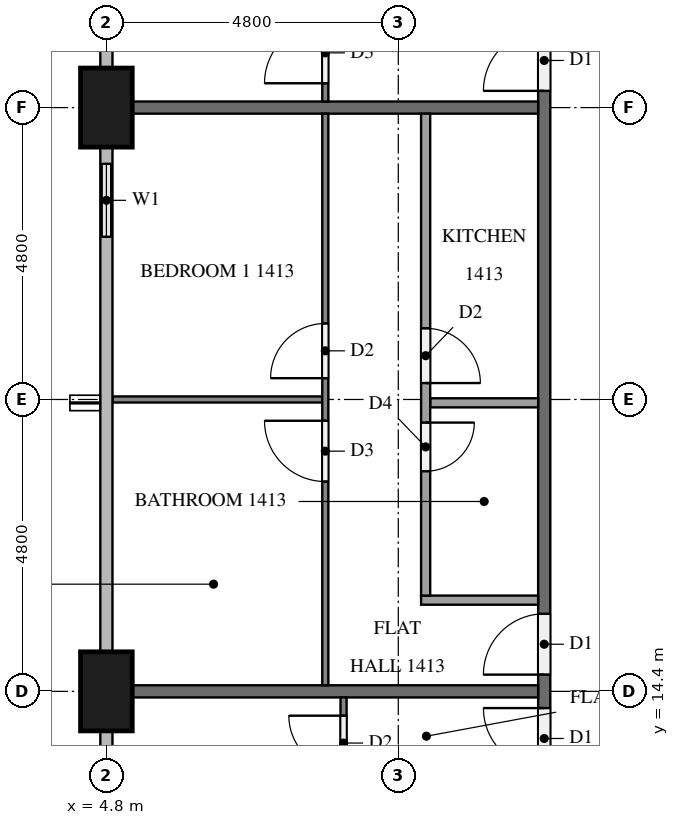
"""IFC4 building model, lengths in metres.
Left out: names, types, materials, properties, quantities, classifications, styles, units other than length and angle.
Written with IfcOpenShell. Run it as: python <this file> out.ifc"""

import sys

from ifc_helpers import new_model, si_unit, direction, frame, frame_2d, origin, origin_2d, place, context, subcontext, project, spatial, rectangle, extrude, element, fill, save


model = new_model("IFC4")
c1 = context("Model", 3, precision=1e-05, world=origin(), true_north=direction((0.0, 1.0)))
c2 = subcontext(c1, "Body", "Model", "MODEL_VIEW")
j1 = project(units=[si_unit("LENGTHUNIT", "METRE"), si_unit("PLANEANGLEUNIT", "RADIAN")], contexts=[c1])
p1 = place(None, origin())
s1 = spatial("IfcSite", under=j1, at=p1, CompositionType="ELEMENT")
p2 = place(p1, origin())
s2 = spatial("IfcBuilding", under=s1, at=p2, CompositionType="ELEMENT")
p3 = place(p2, frame((0.0, 0.0, 59.3)))
s3 = spatial("IfcBuildingStorey", under=s2, at=p3, CompositionType="ELEMENT", Elevation=59.3)
for number, where, z_axis, x_axis in (
    (1, (4.8, 24.0, 0.0), (0.0, 0.0, 1.0), (0.0, 1.0, 0.0)),
    (2, (4.8, 14.4, 0.0), (0.0, 0.0, 1.0), (0.0, 1.0, 0.0)),
):
    element("IfcColumn", number, at=place(p3, frame(where, z_axis=z_axis, x_axis=x_axis)), inside=s3, PredefinedType="COLUMN", context=c2, shape_type="SweptSolid", body=[
        extrude(rectangle(XDim=1.3, YDim=0.85, at=origin_2d()), origin(), (0.0, 0.0, 1.0), 3.2),
    ])
p4 = place(p3, frame((4.8, 23.35, 0.0), z_axis=(0.0, 0.0, 1.0), x_axis=(0.0, -1.0, 0.0)))
e3 = element("IfcWall", 3, at=p4, inside=s3, PredefinedType="SOLIDWALL", context=c2, shape_type="SweptSolid", body=[
    extrude(rectangle(XDim=1.75, YDim=0.15, at=frame_2d((0.875, 0.0))), origin(), (0.0, 0.0, 1.0), 3.2),
])
p5 = place(p4, frame((0.275, 0.0, 0.9)))
e4 = element("IfcOpeningElement", 4, at=p5, cuts=e3, PredefinedType="OPENING", context=c2, shape_type="SweptSolid", body=[
    extrude(rectangle(XDim=1.2, YDim=1.4, at=frame_2d((0.6, 0.7))), frame((0.0, 0.085, 0.0), z_axis=(0.0, -1.0, 0.0), x_axis=(1.0, 0.0, 0.0)), (0.0, 0.0, 1.0), 0.17),
])
p6 = place(p3, frame((4.8, 13.75, 0.0), z_axis=(0.0, 0.0, 1.0), x_axis=(0.0, -1.0, 0.0)))
e5 = element("IfcWall", 5, at=p6, inside=s3, PredefinedType="SOLIDWALL", context=c2, shape_type="SweptSolid", body=[
    extrude(rectangle(XDim=1.75, YDim=0.15, at=frame_2d((0.875, 0.0))), origin(), (0.0, 0.0, 1.0), 3.2),
])
p7 = place(p6, frame((0.275, 0.0, 0.9)))
e6 = element("IfcOpeningElement", 6, at=p7, cuts=e5, PredefinedType="OPENING", context=c2, shape_type="SweptSolid", body=[
    extrude(rectangle(XDim=1.2, YDim=1.4, at=frame_2d((0.6, 0.7))), frame((0.0, 0.085, 0.0), z_axis=(0.0, -1.0, 0.0), x_axis=(1.0, 0.0, 0.0)), (0.0, 0.0, 1.0), 0.17),
])
p8 = place(p3, frame((12.0, 12.1, 0.0), z_axis=(0.0, 0.0, 1.0), x_axis=(0.0, 1.0, 0.0)))
e7 = element("IfcWall", 7, at=p8, inside=s3, PredefinedType="PARTITIONING", context=c2, shape_type="SweptSolid", body=[
    extrude(rectangle(XDim=28.6, YDim=0.2, at=frame_2d((14.3, 0.0))), origin(), (0.0, 0.0, 1.0), 3.2),
])
p9 = place(p8, frame((19.375, 0.0, 0.0)))
e8 = element("IfcOpeningElement", 8, at=p9, cuts=e7, PredefinedType="OPENING", context=c2, shape_type="SweptSolid", body=[
    extrude(rectangle(XDim=1.0, YDim=2.1, at=frame_2d((0.5, 1.05))), frame((0.0, 0.11, 0.0), z_axis=(0.0, -1.0, 0.0), x_axis=(1.0, 0.0, 0.0)), (0.0, 0.0, 1.0), 0.22),
])
p10 = place(p8, frame((12.175, 0.0, 0.0)))
e9 = element("IfcOpeningElement", 9, at=p10, cuts=e7, PredefinedType="OPENING", context=c2, shape_type="SweptSolid", body=[
    extrude(rectangle(XDim=1.0, YDim=2.1, at=frame_2d((0.5, 1.05))), frame((0.0, 0.11, 0.0), z_axis=(0.0, -1.0, 0.0), x_axis=(1.0, 0.0, 0.0)), (0.0, 0.0, 1.0), 0.22),
])
p11 = place(p8, frame((2.575, 0.0, 0.0)))
e10 = element("IfcOpeningElement", 10, at=p11, cuts=e7, PredefinedType="OPENING", context=c2, shape_type="SweptSolid", body=[
    extrude(rectangle(XDim=1.0, YDim=2.1, at=frame_2d((0.5, 1.05))), frame((0.0, 0.11, 0.0), z_axis=(0.0, -1.0, 0.0), x_axis=(1.0, 0.0, 0.0)), (0.0, 0.0, 1.0), 0.22),
])
p12 = place(p8, frame((1.025, 0.0, 0.0)))
e11 = element("IfcOpeningElement", 11, at=p12, cuts=e7, PredefinedType="OPENING", context=c2, shape_type="SweptSolid", body=[
    extrude(rectangle(XDim=1.0, YDim=2.1, at=frame_2d((0.5, 1.05))), frame((0.0, 0.11, 0.0), z_axis=(0.0, -1.0, 0.0), x_axis=(1.0, 0.0, 0.0)), (0.0, 0.0, 1.0), 0.22),
])
for number, where, z_axis, x_axis in (
    (12, (5.225, 24.0, 0.0), (0.0, 0.0, 1.0), (1.0, 0.0, 0.0)),
    (13, (5.225, 14.4, 0.0), (0.0, 0.0, 1.0), (1.0, 0.0, 0.0)),
):
    element("IfcWall", number, at=place(p3, frame(where, z_axis=z_axis, x_axis=x_axis)), inside=s3, PredefinedType="PARTITIONING", context=c2, shape_type="SweptSolid", body=[
        extrude(rectangle(XDim=6.675, YDim=0.2, at=frame_2d((3.337, 0.0))), origin(), (0.0, 0.0, 1.0), 3.2),
    ])
p13 = place(p3, frame((8.4, 24.1, 0.0), z_axis=(0.0, 0.0, 1.0), x_axis=(0.0, 1.0, 0.0)))
e14 = element("IfcWall", 14, at=p13, inside=s3, PredefinedType="PARTITIONING", context=c2, shape_type="SweptSolid", body=[
    extrude(rectangle(XDim=7.0, YDim=0.1, at=frame_2d((3.5, 0.0))), origin(), (0.0, 0.0, 1.0), 3.2),
])
p14 = place(p13, frame((0.3, 0.0, 0.0)))
e15 = element("IfcOpeningElement", 15, at=p14, cuts=e14, PredefinedType="OPENING", context=c2, shape_type="SweptSolid", body=[
    extrude(rectangle(XDim=1.0, YDim=2.1, at=frame_2d((0.5, 1.05))), frame((0.0, 0.06, 0.0), z_axis=(0.0, -1.0, 0.0), x_axis=(1.0, 0.0, 0.0)), (0.0, 0.0, 1.0), 0.12),
])
p15 = place(p3, frame((8.35, 19.2, 0.0), z_axis=(0.0, 0.0, 1.0), x_axis=(-1.0, 0.0, 0.0)))
e16 = element("IfcWall", 16, at=p15, inside=s3, PredefinedType="PARTITIONING", context=c2, shape_type="SweptSolid", body=[
    extrude(rectangle(XDim=3.45, YDim=0.1, at=frame_2d((1.725, 0.0))), origin(), (0.0, 0.0, 1.0), 3.2),
])
p16 = place(p3, frame((8.4, 14.5, 0.0), z_axis=(0.0, 0.0, 1.0), x_axis=(0.0, 1.0, 0.0)))
e17 = element("IfcWall", 17, at=p16, inside=s3, PredefinedType="PARTITIONING", context=c2, shape_type="SweptSolid", body=[
    extrude(rectangle(XDim=9.4, YDim=0.1, at=frame_2d((4.7, 0.0))), origin(), (0.0, 0.0, 1.0), 3.2),
])
p17 = place(p16, frame((3.35, 0.0, 0.0)))
e18 = element("IfcOpeningElement", 18, at=p17, cuts=e17, PredefinedType="OPENING", context=c2, shape_type="SweptSolid", body=[
    extrude(rectangle(XDim=1.0, YDim=2.1, at=frame_2d((0.5, 1.05))), frame((0.0, 0.06, 0.0), z_axis=(0.0, -1.0, 0.0), x_axis=(1.0, 0.0, 0.0)), (0.0, 0.0, 1.0), 0.12),
])
p18 = place(p16, frame((5.05, 0.0, 0.0)))
e19 = element("IfcOpeningElement", 19, at=p18, cuts=e17, PredefinedType="OPENING", context=c2, shape_type="SweptSolid", body=[
    extrude(rectangle(XDim=0.9, YDim=2.1, at=frame_2d((0.45, 1.05))), frame((0.0, 0.06, 0.0), z_axis=(0.0, -1.0, 0.0), x_axis=(1.0, 0.0, 0.0)), (0.0, 0.0, 1.0), 0.12),
])
p19 = place(p3, frame((11.9, 19.145, 0.0), z_axis=(0.0, 0.0, 1.0), x_axis=(-1.0, 0.0, 0.0)))
e20 = element("IfcWall", 20, at=p19, inside=s3, PredefinedType="PARTITIONING", context=c2, shape_type="SweptSolid", body=[
    extrude(rectangle(XDim=1.775, YDim=0.15, at=frame_2d((0.887, 0.0))), origin(), (0.0, 0.0, 1.0), 3.2),
])
p20 = place(p3, frame((11.9, 15.9, 0.0), z_axis=(0.0, 0.0, 1.0), x_axis=(-1.0, 0.0, 0.0)))
e21 = element("IfcWall", 21, at=p20, inside=s3, PredefinedType="PARTITIONING", context=c2, shape_type="SweptSolid", body=[
    extrude(rectangle(XDim=1.925, YDim=0.15, at=frame_2d((0.962, 0.0))), origin(), (0.0, 0.0, 1.0), 3.2),
])
p21 = place(p3, frame((10.05, 23.9, 0.0), z_axis=(0.0, 0.0, 1.0), x_axis=(0.0, -1.0, 0.0)))
e22 = element("IfcWall", 22, at=p21, inside=s3, PredefinedType="PARTITIONING", context=c2, shape_type="SweptSolid", body=[
    extrude(rectangle(XDim=7.925, YDim=0.15, at=frame_2d((3.962, 0.0))), origin(), (0.0, 0.0, 1.0), 3.2),
])
p22 = place(p21, frame((5.08, 0.0, 0.0)))
e23 = element("IfcOpeningElement", 23, at=p22, cuts=e22, PredefinedType="OPENING", context=c2, shape_type="SweptSolid", body=[
    extrude(rectangle(XDim=0.8, YDim=2.1, at=frame_2d((0.4, 1.05))), frame((0.0, 0.085, 0.0), z_axis=(0.0, -1.0, 0.0), x_axis=(1.0, 0.0, 0.0)), (0.0, 0.0, 1.0), 0.17),
])
p23 = place(p21, frame((3.53, 0.0, 0.0)))
e24 = element("IfcOpeningElement", 24, at=p23, cuts=e22, PredefinedType="OPENING", context=c2, shape_type="SweptSolid", body=[
    extrude(rectangle(XDim=0.9, YDim=2.1, at=frame_2d((0.45, 1.05))), frame((0.0, 0.085, 0.0), z_axis=(0.0, -1.0, 0.0), x_axis=(1.0, 0.0, 0.0)), (0.0, 0.0, 1.0), 0.17),
])
p24 = place(p3, frame((8.7, 0.341, 0.0), z_axis=(0.0, 0.0, 1.0), x_axis=(0.0, 1.0, 0.0)))
e25 = element("IfcWall", 25, at=p24, inside=s3, PredefinedType="PARTITIONING", context=c2, shape_type="SweptSolid", body=[
    extrude(rectangle(XDim=13.959, YDim=0.1, at=frame_2d((6.979, 0.0))), origin(), (0.0, 0.0, 1.0), 3.2),
])
p25 = place(p24, frame((12.759, 0.0, 0.0)))
e26 = element("IfcOpeningElement", 26, at=p25, cuts=e25, PredefinedType="OPENING", context=c2, shape_type="SweptSolid", body=[
    extrude(rectangle(XDim=0.9, YDim=2.1, at=frame_2d((0.45, 1.05))), frame((0.0, 0.06, 0.0), z_axis=(0.0, -1.0, 0.0), x_axis=(1.0, 0.0, 0.0)), (0.0, 0.0, 1.0), 0.12),
])
p26 = place(p24, frame((4.809, 0.0, 0.0)))
e27 = element("IfcOpeningElement", 27, at=p26, cuts=e25, PredefinedType="OPENING", context=c2, shape_type="SweptSolid", body=[
    extrude(rectangle(XDim=1.0, YDim=2.1, at=frame_2d((0.5, 1.05))), frame((0.0, 0.06, 0.0), z_axis=(0.0, -1.0, 0.0), x_axis=(1.0, 0.0, 0.0)), (0.0, 0.0, 1.0), 0.12),
])
p27 = place(p24, frame((3.209, 0.0, 0.0)))
e28 = element("IfcOpeningElement", 28, at=p27, cuts=e25, PredefinedType="OPENING", context=c2, shape_type="SweptSolid", body=[
    extrude(rectangle(XDim=0.9, YDim=2.1, at=frame_2d((0.45, 1.05))), frame((0.0, 0.06, 0.0), z_axis=(0.0, -1.0, 0.0), x_axis=(1.0, 0.0, 0.0)), (0.0, 0.0, 1.0), 0.12),
])
p28 = place(p5, origin())
e29 = element("IfcWindow", 29, at=p28, inside=s3, PartitioningType="SINGLE_PANEL", PredefinedType="WINDOW", context=c2, shape_type="SweptSolid", body=[
    extrude(rectangle(XDim=1.2, YDim=1.4, at=frame_2d((0.6, 0.7))), frame((0.0, 0.03, 0.0), z_axis=(0.0, -1.0, 0.0), x_axis=(1.0, 0.0, 0.0)), (0.0, 0.0, 1.0), 0.06),
])
fill(e4, e29)
p29 = place(p10, origin())
e30 = element("IfcDoor", 30, at=p29, inside=s3, OperationType="SINGLE_SWING_LEFT", PredefinedType="DOOR", context=c2, shape_type="SweptSolid", body=[
    extrude(rectangle(XDim=1.0, YDim=2.1, at=frame_2d((0.5, 1.05))), frame((0.0, 0.025, 0.0), z_axis=(0.0, -1.0, 0.0), x_axis=(1.0, 0.0, 0.0)), (0.0, 0.0, 1.0), 0.05),
])
fill(e9, e30)
p30 = place(p11, origin())
e31 = element("IfcDoor", 31, at=p30, inside=s3, OperationType="SINGLE_SWING_LEFT", PredefinedType="DOOR", context=c2, shape_type="SweptSolid", body=[
    extrude(rectangle(XDim=1.0, YDim=2.1, at=frame_2d((0.5, 1.05))), frame((0.0, 0.025, 0.0), z_axis=(0.0, -1.0, 0.0), x_axis=(1.0, 0.0, 0.0)), (0.0, 0.0, 1.0), 0.05),
])
fill(e10, e31)
p31 = place(p12, origin())
e32 = element("IfcDoor", 32, at=p31, inside=s3, OperationType="SINGLE_SWING_RIGHT", PredefinedType="DOOR", context=c2, shape_type="SweptSolid", body=[
    extrude(rectangle(XDim=1.0, YDim=2.1, at=frame_2d((0.5, 1.05))), frame((0.0, 0.025, 0.0), z_axis=(0.0, -1.0, 0.0), x_axis=(1.0, 0.0, 0.0)), (0.0, 0.0, 1.0), 0.05),
])
fill(e11, e32)
p32 = place(p14, origin())
e33 = element("IfcDoor", 33, at=p32, inside=s3, OperationType="SINGLE_SWING_LEFT", PredefinedType="DOOR", context=c2, shape_type="SweptSolid", body=[
    extrude(rectangle(XDim=1.0, YDim=2.1, at=frame_2d((0.5, 1.05))), frame((0.0, 0.025, 0.0), z_axis=(0.0, -1.0, 0.0), x_axis=(1.0, 0.0, 0.0)), (0.0, 0.0, 1.0), 0.05),
])
fill(e15, e33)
p33 = place(p17, origin())
e34 = element("IfcDoor", 34, at=p33, inside=s3, OperationType="SINGLE_SWING_RIGHT", PredefinedType="DOOR", context=c2, shape_type="SweptSolid", body=[
    extrude(rectangle(XDim=1.0, YDim=2.1, at=frame_2d((0.5, 1.05))), frame((0.0, 0.025, 0.0), z_axis=(0.0, -1.0, 0.0), x_axis=(1.0, 0.0, 0.0)), (0.0, 0.0, 1.0), 0.05),
])
fill(e18, e34)
p34 = place(p18, origin())
e35 = element("IfcDoor", 35, at=p34, inside=s3, OperationType="SINGLE_SWING_LEFT", PredefinedType="DOOR", context=c2, shape_type="SweptSolid", body=[
    extrude(rectangle(XDim=0.9, YDim=2.1, at=frame_2d((0.45, 1.05))), frame((0.0, 0.025, 0.0), z_axis=(0.0, -1.0, 0.0), x_axis=(1.0, 0.0, 0.0)), (0.0, 0.0, 1.0), 0.05),
])
fill(e19, e35)
p35 = place(p22, origin())
e36 = element("IfcDoor", 36, at=p35, inside=s3, OperationType="SINGLE_SWING_LEFT", PredefinedType="DOOR", context=c2, shape_type="SweptSolid", body=[
    extrude(rectangle(XDim=0.8, YDim=2.1, at=frame_2d((0.4, 1.05))), frame((0.0, 0.025, 0.0), z_axis=(0.0, -1.0, 0.0), x_axis=(1.0, 0.0, 0.0)), (0.0, 0.0, 1.0), 0.05),
])
fill(e23, e36)
p36 = place(p23, origin())
e37 = element("IfcDoor", 37, at=p36, inside=s3, OperationType="SINGLE_SWING_RIGHT", PredefinedType="DOOR", context=c2, shape_type="SweptSolid", body=[
    extrude(rectangle(XDim=0.9, YDim=2.1, at=frame_2d((0.45, 1.05))), frame((0.0, 0.025, 0.0), z_axis=(0.0, -1.0, 0.0), x_axis=(1.0, 0.0, 0.0)), (0.0, 0.0, 1.0), 0.05),
])
fill(e24, e37)
p37 = place(p25, origin())
e38 = element("IfcDoor", 38, at=p37, inside=s3, OperationType="SINGLE_SWING_RIGHT", PredefinedType="DOOR", context=c2, shape_type="SweptSolid", body=[
    extrude(rectangle(XDim=0.9, YDim=2.1, at=frame_2d((0.45, 1.05))), frame((0.0, 0.025, 0.0), z_axis=(0.0, -1.0, 0.0), x_axis=(1.0, 0.0, 0.0)), (0.0, 0.0, 1.0), 0.05),
])
fill(e26, e38)
save(model, sys.argv[1])
